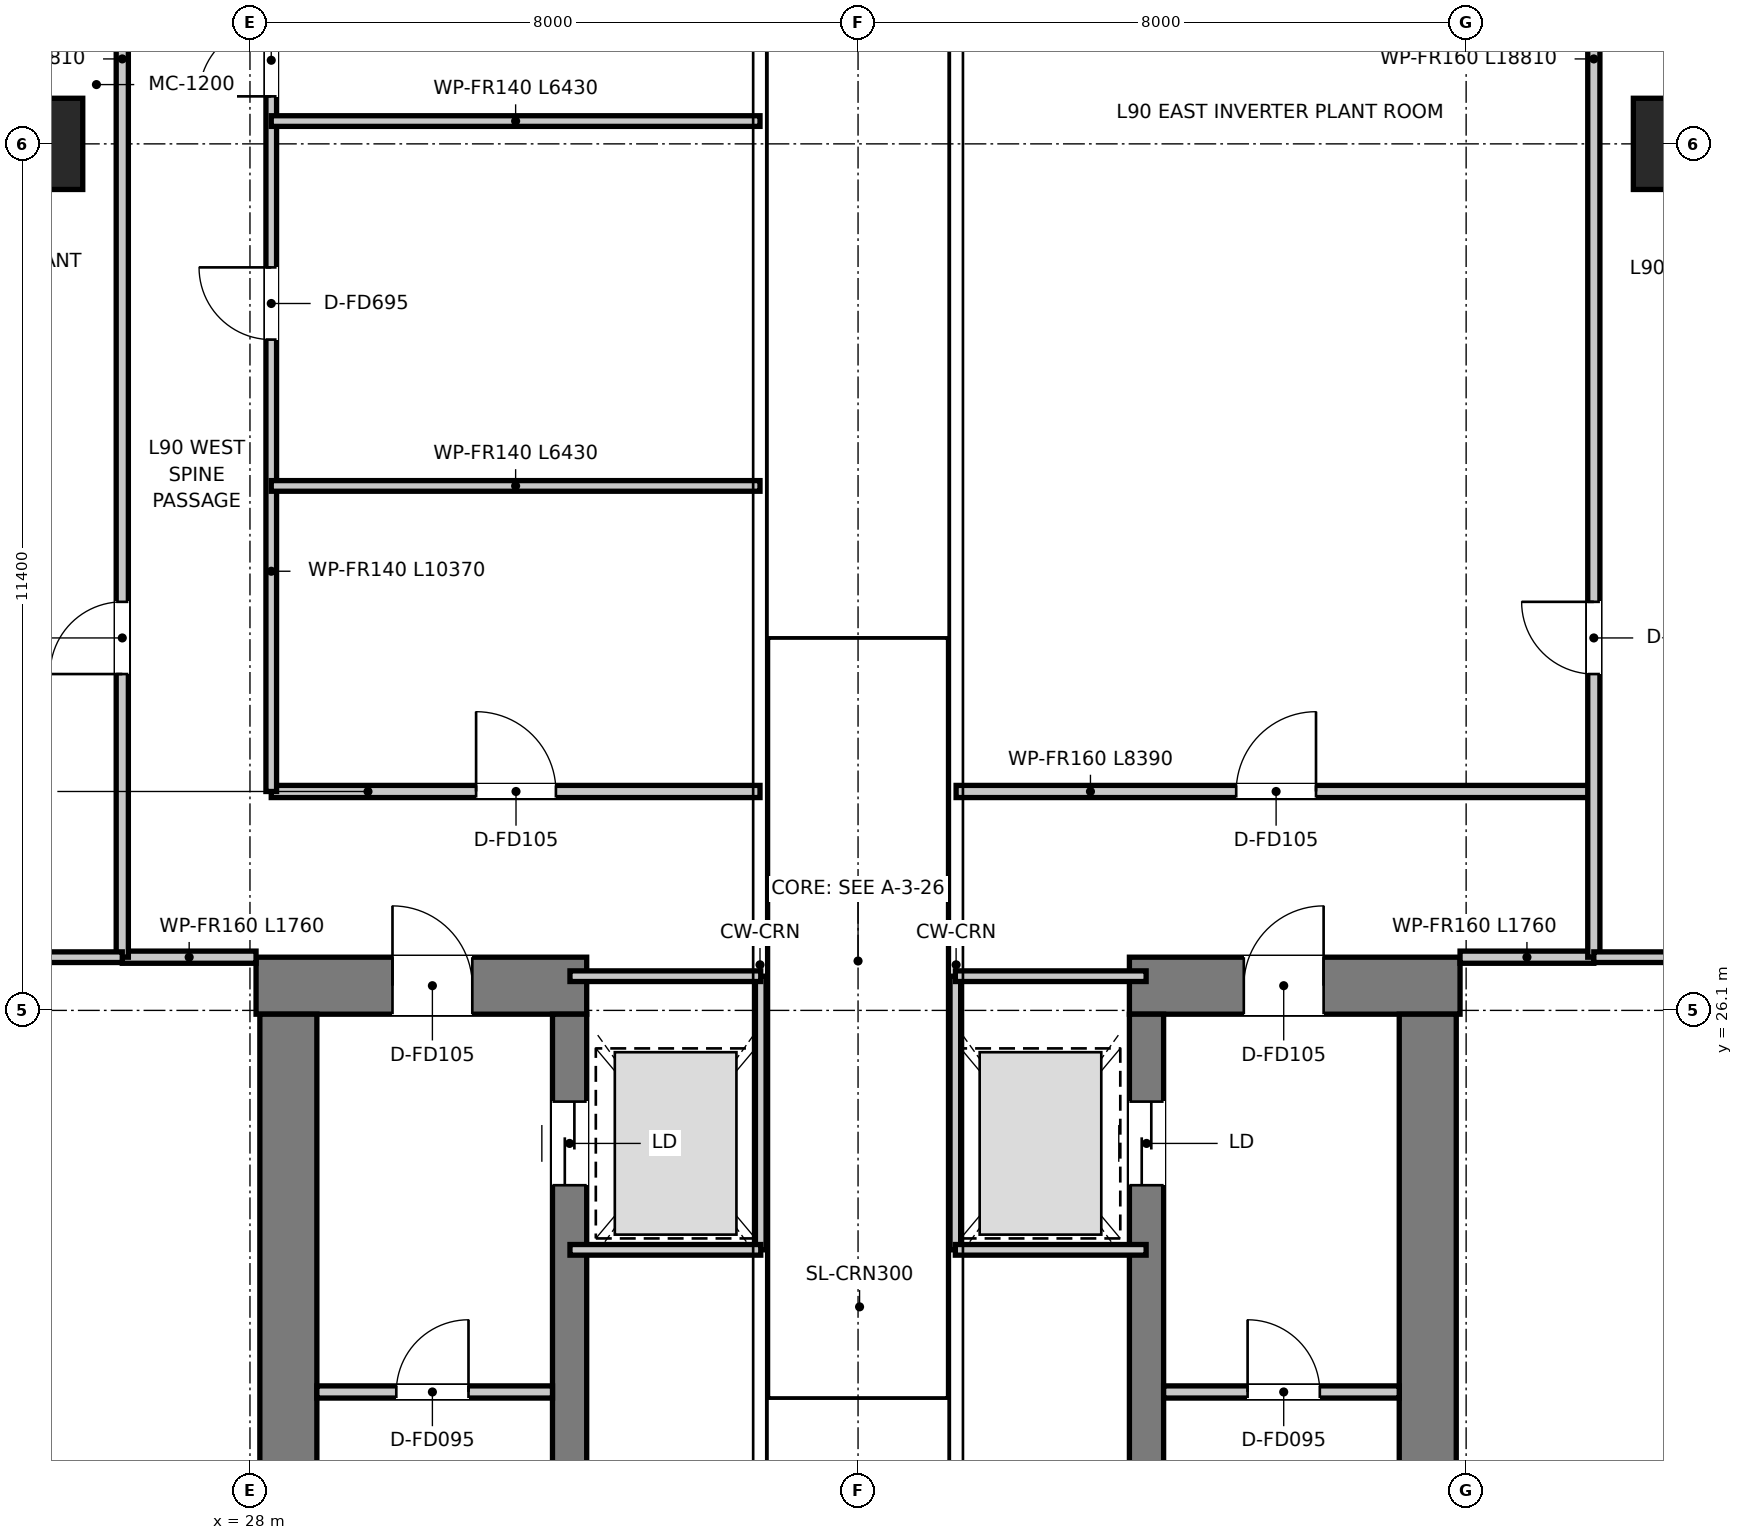
"""IFC4 building model, lengths in metres.
Left out: names, types, materials, properties, quantities, classifications, styles, units other than length and angle.
Written with IfcOpenShell. Run it as: python <this file> out.ifc"""

import sys

from ifc_helpers import new_model, si_unit, direction, frame, frame_2d, origin, origin_2d, place, context, subcontext, project, spatial, rectangle, extrude, source, transform, mapped, element, fill, save


model = new_model("IFC4")
c1 = context("Model", 3, precision=1e-05, world=origin(), true_north=direction((0.0, 1.0)))
c2 = subcontext(c1, "Body", "Model", "MODEL_VIEW")
j1 = project(units=[si_unit("LENGTHUNIT", "METRE"), si_unit("PLANEANGLEUNIT", "RADIAN")], contexts=[c1])
p1 = place(None, origin())
s1 = spatial("IfcSite", under=j1, at=p1, CompositionType="ELEMENT")
p2 = place(p1, origin())
s2 = spatial("IfcBuilding", under=s1, at=p2, CompositionType="ELEMENT")
p3 = place(p2, frame((0.0, 0.0, 367.05)))
s3 = spatial("IfcBuildingStorey", under=s2, at=p3, CompositionType="ELEMENT", Elevation=367.05)
p4 = place(p3, frame((28.08, 26.425, 0.0), z_axis=(0.0, 0.0, 1.0), x_axis=(1.0, 0.0, 0.0)))
e1 = element("IfcWall", 1, at=p4, inside=s3, PredefinedType="SHEAR", context=c2, shape_type="SweptSolid", body=[
    extrude(rectangle(XDim=4.35, YDim=0.75, at=frame_2d((2.175, 0.0))), origin(), (0.0, 0.0, 1.0), 3.8),
])
p5 = place(p4, frame((1.795, 0.0, 0.0)))
e2 = element("IfcOpeningElement", 2, at=p5, cuts=e1, PredefinedType="OPENING", context=c2, shape_type="SweptSolid", body=[
    extrude(rectangle(XDim=1.05, YDim=2.1, at=frame_2d((0.525, 1.05))), frame((0.0, 0.385, 0.0), z_axis=(0.0, -1.0, 0.0), x_axis=(1.0, 0.0, 0.0)), (0.0, 0.0, 1.0), 0.77),
])
p6 = place(p3, frame((28.505, 11.25, 0.0), z_axis=(0.0, 0.0, 1.0), x_axis=(0.0, 1.0, 0.0)))
e3 = element("IfcWall", 3, at=p6, inside=s3, PredefinedType="SHEAR", context=c2, shape_type="SweptSolid", body=[
    extrude(rectangle(XDim=14.8, YDim=0.75, at=frame_2d((7.4, 0.0))), origin(), (0.0, 0.0, 1.0), 3.8),
])
p7 = place(p3, frame((32.205, 13.22, 0.0), z_axis=(0.0, 0.0, 1.0), x_axis=(0.0, 1.0, 0.0)))
e4 = element("IfcWall", 4, at=p7, inside=s3, PredefinedType="SHEAR", context=c2, shape_type="SweptSolid", body=[
    extrude(rectangle(XDim=12.83, YDim=0.45, at=frame_2d((6.415, 0.0))), origin(), (0.0, 0.0, 1.0), 3.8),
])
p8 = place(p7, frame((10.58, 0.0, 0.0)))
e5 = element("IfcOpeningElement", 5, at=p8, cuts=e4, PredefinedType="OPENING", context=c2, shape_type="SweptSolid", body=[
    extrude(rectangle(XDim=1.1, YDim=2.15, at=frame_2d((0.55, 1.075))), frame((0.0, 0.235, 0.0), z_axis=(0.0, -1.0, 0.0), x_axis=(1.0, 0.0, 0.0)), (0.0, 0.0, 1.0), 0.47),
])
p9 = place(p3, frame((39.57, 26.425, 0.0), z_axis=(0.0, 0.0, 1.0), x_axis=(1.0, 0.0, 0.0)))
e6 = element("IfcWall", 6, at=p9, inside=s3, PredefinedType="SHEAR", context=c2, shape_type="SweptSolid", body=[
    extrude(rectangle(XDim=4.35, YDim=0.75, at=frame_2d((2.175, 0.0))), origin(), (0.0, 0.0, 1.0), 3.8),
])
p10 = place(p9, frame((1.505, 0.0, 0.0)))
e7 = element("IfcOpeningElement", 7, at=p10, cuts=e6, PredefinedType="OPENING", context=c2, shape_type="SweptSolid", body=[
    extrude(rectangle(XDim=1.05, YDim=2.1, at=frame_2d((0.525, 1.05))), frame((0.0, 0.385, 0.0), z_axis=(0.0, -1.0, 0.0), x_axis=(1.0, 0.0, 0.0)), (0.0, 0.0, 1.0), 0.77),
])
p11 = place(p3, frame((39.795, 13.22, 0.0), z_axis=(0.0, 0.0, 1.0), x_axis=(0.0, 1.0, 0.0)))
e8 = element("IfcWall", 8, at=p11, inside=s3, PredefinedType="SHEAR", context=c2, shape_type="SweptSolid", body=[
    extrude(rectangle(XDim=12.83, YDim=0.45, at=frame_2d((6.415, 0.0))), origin(), (0.0, 0.0, 1.0), 3.8),
])
p12 = place(p11, frame((10.58, 0.0, 0.0)))
e9 = element("IfcOpeningElement", 9, at=p12, cuts=e8, PredefinedType="OPENING", context=c2, shape_type="SweptSolid", body=[
    extrude(rectangle(XDim=1.1, YDim=2.15, at=frame_2d((0.55, 1.075))), frame((0.0, 0.235, 0.0), z_axis=(0.0, -1.0, 0.0), x_axis=(1.0, 0.0, 0.0)), (0.0, 0.0, 1.0), 0.47),
])
p13 = place(p3, frame((43.495, 11.25, 0.0), z_axis=(0.0, 0.0, 1.0), x_axis=(0.0, 1.0, 0.0)))
e10 = element("IfcWall", 10, at=p13, inside=s3, PredefinedType="SHEAR", context=c2, shape_type="SweptSolid", body=[
    extrude(rectangle(XDim=14.8, YDim=0.75, at=frame_2d((7.4, 0.0))), origin(), (0.0, 0.0, 1.0), 3.8),
])
m1 = source(origin(), c2, "Body", "SweptSolid", [
    extrude(rectangle(XDim=1.2, YDim=1.2, at=origin_2d()), origin(), (0.0, 0.0, 1.0), 3.8),
])
for number, where, z_axis, x_axis in (
    (11, (46.8, 37.5, 0.0), (0.0, 0.0, 1.0), (1.0, 0.0, 0.0)),
    (12, (25.2, 37.5, 0.0), (0.0, 0.0, 1.0), (1.0, 0.0, 0.0)),
):
    element("IfcColumn", number, at=place(p3, frame(where, z_axis=z_axis, x_axis=x_axis)), inside=s3, PredefinedType="USERDEFINED", context=c2, shape_type="MappedRepresentation", body=[
        mapped(m1, transform((0.0, 0.0, 0.0), x_axis=(1.0, 0.0, 0.0), y_axis=(0.0, 1.0, 0.0), z_axis=(0.0, 0.0, 1.0), scale=1.0)),
    ])
p14 = place(p3, frame((28.88, 21.08, 0.0), z_axis=(0.0, 0.0, 1.0), x_axis=(1.0, 0.0, 0.0)))
e13 = element("IfcWall", 13, at=p14, inside=s3, PredefinedType="PARTITIONING", context=c2, shape_type="SweptSolid", body=[
    extrude(rectangle(XDim=3.1, YDim=0.16, at=frame_2d((1.55, 0.0))), origin(), (0.0, 0.0, 1.0), 3.5),
])
p15 = place(p14, frame((1.045, 0.0, 0.0)))
e14 = element("IfcOpeningElement", 14, at=p15, cuts=e13, PredefinedType="OPENING", context=c2, shape_type="SweptSolid", body=[
    extrude(rectangle(XDim=0.95, YDim=2.1, at=frame_2d((0.475, 1.05))), frame((0.0, 0.09, 0.0), z_axis=(0.0, -1.0, 0.0), x_axis=(1.0, 0.0, 0.0)), (0.0, 0.0, 1.0), 0.18),
])
p16 = place(p3, frame((34.72, 22.95, 0.0), z_axis=(0.0, 0.0, 1.0), x_axis=(0.0, 1.0, 0.0)))
e15 = element("IfcWall", 15, at=p16, inside=s3, PredefinedType="PARTITIONING", context=c2, shape_type="SweptSolid", body=[
    extrude(rectangle(XDim=3.6, YDim=0.14, at=frame_2d((1.8, 0.0))), origin(), (0.0, 0.0, 1.0), 3.5),
])
for number, where, z_axis, x_axis in (
    (16, (32.21, 22.95, 0.0), (0.0, 0.0, 1.0), (1.0, 0.0, 0.0)),
    (17, (32.21, 26.55, 0.0), (0.0, 0.0, 1.0), (1.0, 0.0, 0.0)),
):
    element("IfcWall", number, at=place(p3, frame(where, z_axis=z_axis, x_axis=x_axis)), inside=s3, PredefinedType="PARTITIONING", context=c2, shape_type="SweptSolid", body=[
        extrude(rectangle(XDim=2.51, YDim=0.14, at=frame_2d((1.255, 0.0))), origin(), (0.0, 0.0, 1.0), 3.5),
    ])
p17 = place(p3, frame((40.02, 21.08, 0.0), z_axis=(0.0, 0.0, 1.0), x_axis=(1.0, 0.0, 0.0)))
e18 = element("IfcWall", 18, at=p17, inside=s3, PredefinedType="PARTITIONING", context=c2, shape_type="SweptSolid", body=[
    extrude(rectangle(XDim=3.1, YDim=0.16, at=frame_2d((1.55, 0.0))), origin(), (0.0, 0.0, 1.0), 3.5),
])
p18 = place(p17, frame((1.105, 0.0, 0.0)))
e19 = element("IfcOpeningElement", 19, at=p18, cuts=e18, PredefinedType="OPENING", context=c2, shape_type="SweptSolid", body=[
    extrude(rectangle(XDim=0.95, YDim=2.1, at=frame_2d((0.475, 1.05))), frame((0.0, 0.09, 0.0), z_axis=(0.0, -1.0, 0.0), x_axis=(1.0, 0.0, 0.0)), (0.0, 0.0, 1.0), 0.18),
])
p19 = place(p3, frame((37.28, 22.95, 0.0), z_axis=(0.0, 0.0, 1.0), x_axis=(0.0, 1.0, 0.0)))
e20 = element("IfcWall", 20, at=p19, inside=s3, PredefinedType="PARTITIONING", context=c2, shape_type="SweptSolid", body=[
    extrude(rectangle(XDim=3.6, YDim=0.14, at=frame_2d((1.8, 0.0))), origin(), (0.0, 0.0, 1.0), 3.5),
])
for number, where, z_axis, x_axis in (
    (21, (37.28, 22.95, 0.0), (0.0, 0.0, 1.0), (1.0, 0.0, 0.0)),
    (22, (37.28, 26.55, 0.0), (0.0, 0.0, 1.0), (1.0, 0.0, 0.0)),
):
    element("IfcWall", number, at=place(p3, frame(where, z_axis=z_axis, x_axis=x_axis)), inside=s3, PredefinedType="PARTITIONING", context=c2, shape_type="SweptSolid", body=[
        extrude(rectangle(XDim=2.51, YDim=0.14, at=frame_2d((1.255, 0.0))), origin(), (0.0, 0.0, 1.0), 3.5),
    ])
p20 = place(p3, frame((28.28, 28.98, 0.0), z_axis=(0.0, 0.0, 1.0), x_axis=(1.0, 0.0, 0.0)))
e23 = element("IfcWall", 23, at=p20, inside=s3, PredefinedType="PARTITIONING", context=c2, shape_type="SweptSolid", body=[
    extrude(rectangle(XDim=6.43, YDim=0.16, at=frame_2d((3.215, 0.0))), origin(), (0.0, 0.0, 1.0), 3.01),
])
p21 = place(p20, frame((2.695, 0.0, 0.0)))
e24 = element("IfcOpeningElement", 24, at=p21, cuts=e23, PredefinedType="OPENING", context=c2, shape_type="SweptSolid", body=[
    extrude(rectangle(XDim=1.05, YDim=2.1, at=frame_2d((0.525, 1.05))), frame((0.0, 0.09, 0.0), z_axis=(0.0, -1.0, 0.0), x_axis=(1.0, 0.0, 0.0)), (0.0, 0.0, 1.0), 0.18),
])
p22 = place(p3, frame((26.32, 26.8, 0.0), z_axis=(0.0, 0.0, 1.0), x_axis=(1.0, 0.0, 0.0)))
e25 = element("IfcWall", 25, at=p22, inside=s3, PredefinedType="PARTITIONING", context=c2, shape_type="SweptSolid", body=[
    extrude(rectangle(XDim=1.76, YDim=0.16, at=frame_2d((0.88, 0.0))), origin(), (0.0, 0.0, 1.0), 3.5),
])
p23 = place(p3, frame((26.32, 26.8, 0.0), z_axis=(0.0, 0.0, 1.0), x_axis=(0.0, 1.0, 0.0)))
e26 = element("IfcWall", 26, at=p23, inside=s3, PredefinedType="PARTITIONING", context=c2, shape_type="SweptSolid", body=[
    extrude(rectangle(XDim=18.81, YDim=0.16, at=frame_2d((9.405, 0.0))), origin(), (0.0, 0.0, 1.0), 3.01),
])
p24 = place(p23, frame((3.725, 0.0, 0.0)))
e27 = element("IfcOpeningElement", 27, at=p24, cuts=e26, PredefinedType="OPENING", context=c2, shape_type="SweptSolid", body=[
    extrude(rectangle(XDim=0.95, YDim=2.1, at=frame_2d((0.475, 1.05))), frame((0.0, 0.09, 0.0), z_axis=(0.0, -1.0, 0.0), x_axis=(1.0, 0.0, 0.0)), (0.0, 0.0, 1.0), 0.18),
])
p25 = place(p3, frame((21.45, 26.8, 0.0), z_axis=(0.0, 0.0, 1.0), x_axis=(1.0, 0.0, 0.0)))
e28 = element("IfcWall", 28, at=p25, inside=s3, PredefinedType="PARTITIONING", context=c2, shape_type="SweptSolid", body=[
    extrude(rectangle(XDim=4.87, YDim=0.14, at=frame_2d((2.435, 0.0))), origin(), (0.0, 0.0, 1.0), 3.01),
])
p26 = place(p3, frame((28.28, 28.98, 0.0), z_axis=(0.0, 0.0, 1.0), x_axis=(0.0, 1.0, 0.0)))
e29 = element("IfcWall", 29, at=p26, inside=s3, PredefinedType="PARTITIONING", context=c2, shape_type="SweptSolid", body=[
    extrude(rectangle(XDim=10.37, YDim=0.14, at=frame_2d((5.185, 0.0))), origin(), (0.0, 0.0, 1.0), 3.5),
])
p27 = place(p26, frame((5.945, 0.0, 0.0)))
e30 = element("IfcOpeningElement", 30, at=p27, cuts=e29, PredefinedType="OPENING", context=c2, shape_type="SweptSolid", body=[
    extrude(rectangle(XDim=0.95, YDim=2.1, at=frame_2d((0.475, 1.05))), frame((0.0, 0.08, 0.0), z_axis=(0.0, -1.0, 0.0), x_axis=(1.0, 0.0, 0.0)), (0.0, 0.0, 1.0), 0.16),
])
p28 = place(p26, frame((9.145, 0.0, 0.0)))
e31 = element("IfcOpeningElement", 31, at=p28, cuts=e29, PredefinedType="OPENING", context=c2, shape_type="SweptSolid", body=[
    extrude(rectangle(XDim=0.95, YDim=2.1, at=frame_2d((0.475, 1.05))), frame((0.0, 0.08, 0.0), z_axis=(0.0, -1.0, 0.0), x_axis=(1.0, 0.0, 0.0)), (0.0, 0.0, 1.0), 0.16),
])
for number, where, z_axis, x_axis in (
    (32, (28.28, 33.0, 0.0), (0.0, 0.0, 1.0), (1.0, 0.0, 0.0)),
    (33, (28.28, 37.8, 0.0), (0.0, 0.0, 1.0), (1.0, 0.0, 0.0)),
):
    element("IfcWall", number, at=place(p3, frame(where, z_axis=z_axis, x_axis=x_axis)), inside=s3, PredefinedType="PARTITIONING", context=c2, shape_type="SweptSolid", body=[
        extrude(rectangle(XDim=6.43, YDim=0.14, at=frame_2d((3.215, 0.0))), origin(), (0.0, 0.0, 1.0), 3.01),
    ])
p29 = place(p3, frame((37.29, 28.98, 0.0), z_axis=(0.0, 0.0, 1.0), x_axis=(1.0, 0.0, 0.0)))
e34 = element("IfcWall", 34, at=p29, inside=s3, PredefinedType="PARTITIONING", context=c2, shape_type="SweptSolid", body=[
    extrude(rectangle(XDim=8.39, YDim=0.16, at=frame_2d((4.195, 0.0))), origin(), (0.0, 0.0, 1.0), 3.01),
])
p30 = place(p29, frame((3.685, 0.0, 0.0)))
e35 = element("IfcOpeningElement", 35, at=p30, cuts=e34, PredefinedType="OPENING", context=c2, shape_type="SweptSolid", body=[
    extrude(rectangle(XDim=1.05, YDim=2.1, at=frame_2d((0.525, 1.05))), frame((0.0, 0.09, 0.0), z_axis=(0.0, -1.0, 0.0), x_axis=(1.0, 0.0, 0.0)), (0.0, 0.0, 1.0), 0.18),
])
p31 = place(p3, frame((43.92, 26.8, 0.0), z_axis=(0.0, 0.0, 1.0), x_axis=(1.0, 0.0, 0.0)))
e36 = element("IfcWall", 36, at=p31, inside=s3, PredefinedType="PARTITIONING", context=c2, shape_type="SweptSolid", body=[
    extrude(rectangle(XDim=1.76, YDim=0.16, at=frame_2d((0.88, 0.0))), origin(), (0.0, 0.0, 1.0), 3.5),
])
p32 = place(p3, frame((45.68, 26.8, 0.0), z_axis=(0.0, 0.0, 1.0), x_axis=(0.0, 1.0, 0.0)))
e37 = element("IfcWall", 37, at=p32, inside=s3, PredefinedType="PARTITIONING", context=c2, shape_type="SweptSolid", body=[
    extrude(rectangle(XDim=18.81, YDim=0.16, at=frame_2d((9.405, 0.0))), origin(), (0.0, 0.0, 1.0), 3.01),
])
p33 = place(p32, frame((3.725, 0.0, 0.0)))
e38 = element("IfcOpeningElement", 38, at=p33, cuts=e37, PredefinedType="OPENING", context=c2, shape_type="SweptSolid", body=[
    extrude(rectangle(XDim=0.95, YDim=2.1, at=frame_2d((0.475, 1.05))), frame((0.0, 0.09, 0.0), z_axis=(0.0, -1.0, 0.0), x_axis=(1.0, 0.0, 0.0)), (0.0, 0.0, 1.0), 0.18),
])
p34 = place(p3, frame((45.68, 26.8, 0.0), z_axis=(0.0, 0.0, 1.0), x_axis=(1.0, 0.0, 0.0)))
e39 = element("IfcWall", 39, at=p34, inside=s3, PredefinedType="PARTITIONING", context=c2, shape_type="SweptSolid", body=[
    extrude(rectangle(XDim=4.87, YDim=0.14, at=frame_2d((2.435, 0.0))), origin(), (0.0, 0.0, 1.0), 3.01),
])
p35 = place(p15, origin())
e40 = element("IfcDoor", 40, at=p35, inside=s3, OperationType="SINGLE_SWING_RIGHT", PredefinedType="DOOR", context=c2, shape_type="SweptSolid", body=[
    extrude(rectangle(XDim=0.95, YDim=2.1, at=frame_2d((0.475, 1.05))), frame((0.0, 0.025, 0.0), z_axis=(0.0, -1.0, 0.0), x_axis=(1.0, 0.0, 0.0)), (0.0, 0.0, 1.0), 0.05),
])
fill(e14, e40)
p36 = place(p8, origin())
e41 = element("IfcDoor", 41, at=p36, inside=s3, OperationType="DOUBLE_DOOR_SLIDING", PredefinedType="DOOR", context=c2, shape_type="SweptSolid", body=[
    extrude(rectangle(XDim=1.1, YDim=2.15, at=frame_2d((0.55, 1.075))), frame((0.0, 0.025, 0.0), z_axis=(0.0, -1.0, 0.0), x_axis=(1.0, 0.0, 0.0)), (0.0, 0.0, 1.0), 0.05),
])
fill(e5, e41)
p37 = place(p5, origin())
e42 = element("IfcDoor", 42, at=p37, inside=s3, OperationType="SINGLE_SWING_LEFT", PredefinedType="DOOR", context=c2, shape_type="SweptSolid", body=[
    extrude(rectangle(XDim=1.05, YDim=2.1, at=frame_2d((0.525, 1.05))), frame((0.0, 0.025, 0.0), z_axis=(0.0, -1.0, 0.0), x_axis=(1.0, 0.0, 0.0)), (0.0, 0.0, 1.0), 0.05),
])
fill(e2, e42)
p38 = place(p18, origin())
e43 = element("IfcDoor", 43, at=p38, inside=s3, OperationType="SINGLE_SWING_LEFT", PredefinedType="DOOR", context=c2, shape_type="SweptSolid", body=[
    extrude(rectangle(XDim=0.95, YDim=2.1, at=frame_2d((0.475, 1.05))), frame((0.0, 0.025, 0.0), z_axis=(0.0, -1.0, 0.0), x_axis=(1.0, 0.0, 0.0)), (0.0, 0.0, 1.0), 0.05),
])
fill(e19, e43)
p39 = place(p12, origin())
e44 = element("IfcDoor", 44, at=p39, inside=s3, OperationType="DOUBLE_DOOR_SLIDING", PredefinedType="DOOR", context=c2, shape_type="SweptSolid", body=[
    extrude(rectangle(XDim=1.1, YDim=2.15, at=frame_2d((0.55, 1.075))), frame((0.0, 0.025, 0.0), z_axis=(0.0, -1.0, 0.0), x_axis=(1.0, 0.0, 0.0)), (0.0, 0.0, 1.0), 0.05),
])
fill(e9, e44)
p40 = place(p10, origin())
e45 = element("IfcDoor", 45, at=p40, inside=s3, OperationType="SINGLE_SWING_RIGHT", PredefinedType="DOOR", context=c2, shape_type="SweptSolid", body=[
    extrude(rectangle(XDim=1.05, YDim=2.1, at=frame_2d((0.525, 1.05))), frame((0.0, 0.025, 0.0), z_axis=(0.0, -1.0, 0.0), x_axis=(1.0, 0.0, 0.0)), (0.0, 0.0, 1.0), 0.05),
])
fill(e7, e45)
p41 = place(p21, origin())
e46 = element("IfcDoor", 46, at=p41, inside=s3, OperationType="SINGLE_SWING_LEFT", PredefinedType="DOOR", context=c2, shape_type="SweptSolid", body=[
    extrude(rectangle(XDim=1.05, YDim=2.1, at=frame_2d((0.525, 1.05))), frame((0.0, 0.025, 0.0), z_axis=(0.0, -1.0, 0.0), x_axis=(1.0, 0.0, 0.0)), (0.0, 0.0, 1.0), 0.05),
])
fill(e24, e46)
p42 = place(p27, origin())
e47 = element("IfcDoor", 47, at=p42, inside=s3, OperationType="SINGLE_SWING_RIGHT", PredefinedType="DOOR", context=c2, shape_type="SweptSolid", body=[
    extrude(rectangle(XDim=0.95, YDim=2.1, at=frame_2d((0.475, 1.05))), frame((0.0, 0.025, 0.0), z_axis=(0.0, -1.0, 0.0), x_axis=(1.0, 0.0, 0.0)), (0.0, 0.0, 1.0), 0.05),
])
fill(e30, e47)
p43 = place(p28, origin())
e48 = element("IfcDoor", 48, at=p43, inside=s3, OperationType="SINGLE_SWING_LEFT", PredefinedType="DOOR", context=c2, shape_type="SweptSolid", body=[
    extrude(rectangle(XDim=0.95, YDim=2.1, at=frame_2d((0.475, 1.05))), frame((0.0, 0.025, 0.0), z_axis=(0.0, -1.0, 0.0), x_axis=(1.0, 0.0, 0.0)), (0.0, 0.0, 1.0), 0.05),
])
fill(e31, e48)
p44 = place(p24, origin())
e49 = element("IfcDoor", 49, at=p44, inside=s3, OperationType="SINGLE_SWING_LEFT", PredefinedType="DOOR", context=c2, shape_type="SweptSolid", body=[
    extrude(rectangle(XDim=0.95, YDim=2.1, at=frame_2d((0.475, 1.05))), frame((0.0, 0.025, 0.0), z_axis=(0.0, -1.0, 0.0), x_axis=(1.0, 0.0, 0.0)), (0.0, 0.0, 1.0), 0.05),
])
fill(e27, e49)
p45 = place(p30, origin())
e50 = element("IfcDoor", 50, at=p45, inside=s3, OperationType="SINGLE_SWING_RIGHT", PredefinedType="DOOR", context=c2, shape_type="SweptSolid", body=[
    extrude(rectangle(XDim=1.05, YDim=2.1, at=frame_2d((0.525, 1.05))), frame((0.0, 0.025, 0.0), z_axis=(0.0, -1.0, 0.0), x_axis=(1.0, 0.0, 0.0)), (0.0, 0.0, 1.0), 0.05),
])
fill(e35, e50)
p46 = place(p33, origin())
e51 = element("IfcDoor", 51, at=p46, inside=s3, OperationType="SINGLE_SWING_RIGHT", PredefinedType="DOOR", context=c2, shape_type="SweptSolid", body=[
    extrude(rectangle(XDim=0.95, YDim=2.1, at=frame_2d((0.475, 1.05))), frame((0.0, 0.025, 0.0), z_axis=(0.0, -1.0, 0.0), x_axis=(1.0, 0.0, 0.0)), (0.0, 0.0, 1.0), 0.05),
])
fill(e38, e51)
save(model, sys.argv[1])
